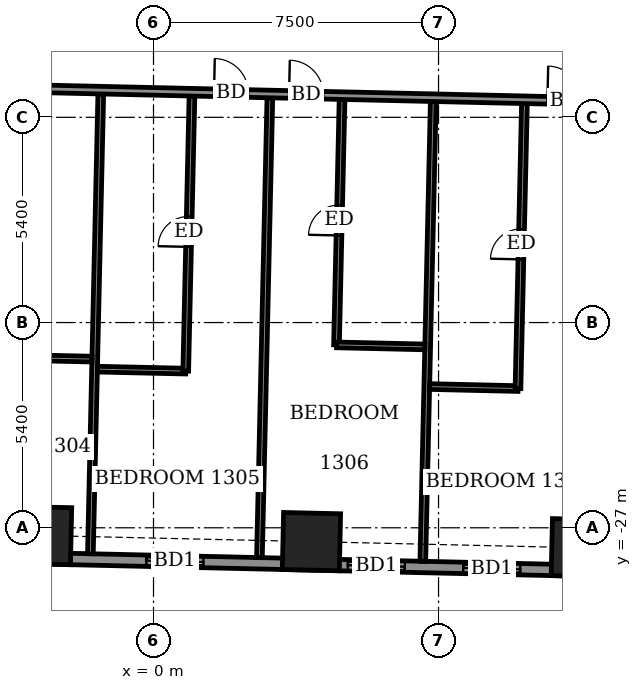
"""IFC4 building model, lengths in metres.
Left out: names, types, materials, properties, quantities, classifications, styles, units other than length and angle.
Written with IfcOpenShell. Run it as: python <this file> out.ifc"""

import sys

from ifc_helpers import new_model, si_unit, direction, frame, frame_2d, origin, origin_2d, place, context, subcontext, project, spatial, rectangle, extrude, element, fill, save


model = new_model("IFC4")
c1 = context("Model", 3, precision=1e-05, world=origin(), true_north=direction((0.0, 1.0)))
c2 = subcontext(c1, "Body", "Model", "MODEL_VIEW")
j1 = project(units=[si_unit("LENGTHUNIT", "METRE"), si_unit("PLANEANGLEUNIT", "RADIAN")], contexts=[c1])
p1 = place(None, origin())
s1 = spatial("IfcSite", under=j1, at=p1, CompositionType="ELEMENT")
p2 = place(p1, origin())
s2 = spatial("IfcBuilding", under=s1, at=p2, CompositionType="ELEMENT")
p3 = place(p2, frame((0.0, 0.0, 56.7)))
s3 = spatial("IfcBuildingStorey", under=s2, at=p3, CompositionType="ELEMENT", Elevation=56.7)
for number, where, z_axis, x_axis in (
    (1, (-2.919, -27.204, -0.55), (0.0, 0.0, 1.0), (1.0, -0.023, 0.0)),
    (2, (4.156, -27.364, -0.55), (0.0, 0.0, 1.0), (1.0, -0.023, 0.0)),
    (3, (11.23, -27.525, -0.55), (0.0, 0.0, 1.0), (1.0, -0.023, 0.0)),
):
    element("IfcColumn", number, at=place(p3, frame(where, z_axis=z_axis, x_axis=x_axis)), inside=s3, PredefinedType="COLUMN", context=c2, shape_type="SweptSolid", body=[
        extrude(rectangle(XDim=1.5, YDim=1.5, at=origin_2d()), origin(), (0.0, 0.0, 1.0), 3.6),
    ])
p4 = place(p3, frame((-24.007, -27.326, 0.0), z_axis=(0.0, 0.0, 1.0), x_axis=(0.999742536491, -0.022690542744, 0.0)))
e4 = element("IfcWall", 4, at=p4, inside=s3, PredefinedType="SOLIDWALL", context=c2, shape_type="SweptSolid", body=[
    extrude(rectangle(XDim=49.236, YDim=0.3, at=frame_2d((24.618, 0.0))), origin(), (0.0, 0.0, 1.0), 3.05),
])
p5 = place(p4, frame((2.115, 0.0, 0.0)))
e5 = element("IfcOpeningElement", 5, at=p5, cuts=e4, PredefinedType="OPENING", context=c2, shape_type="SweptSolid", body=[
    extrude(rectangle(XDim=1.5, YDim=2.4, at=frame_2d((0.75, 1.2))), frame((0.0, 0.16, 0.0), z_axis=(0.0, -1.0, 0.0), x_axis=(1.0, 0.0, 0.0)), (0.0, 0.0, 1.0), 0.32),
])
p6 = place(p4, frame((5.088, 0.0, 0.9)))
e6 = element("IfcOpeningElement", 6, at=p6, cuts=e4, PredefinedType="OPENING", context=c2, shape_type="SweptSolid", body=[
    extrude(rectangle(XDim=0.9, YDim=1.5, at=frame_2d((0.45, 0.75))), frame((0.0, 0.16, 0.0), z_axis=(0.0, -1.0, 0.0), x_axis=(1.0, 0.0, 0.0)), (0.0, 0.0, 1.0), 0.32),
])
p7 = place(p4, frame((10.475, 0.0, 0.0)))
e7 = element("IfcOpeningElement", 7, at=p7, cuts=e4, PredefinedType="OPENING", context=c2, shape_type="SweptSolid", body=[
    extrude(rectangle(XDim=1.5, YDim=2.4, at=frame_2d((0.75, 1.2))), frame((0.0, 0.16, 0.0), z_axis=(0.0, -1.0, 0.0), x_axis=(1.0, 0.0, 0.0)), (0.0, 0.0, 1.0), 0.32),
])
p8 = place(p4, frame((15.477, 0.0, 0.0)))
e8 = element("IfcOpeningElement", 8, at=p8, cuts=e4, PredefinedType="OPENING", context=c2, shape_type="SweptSolid", body=[
    extrude(rectangle(XDim=1.5, YDim=2.4, at=frame_2d((0.75, 1.2))), frame((0.0, 0.16, 0.0), z_axis=(0.0, -1.0, 0.0), x_axis=(1.0, 0.0, 0.0)), (0.0, 0.0, 1.0), 0.32),
])
p9 = place(p4, frame((18.515, 0.0, 0.0)))
e9 = element("IfcOpeningElement", 9, at=p9, cuts=e4, PredefinedType="OPENING", context=c2, shape_type="SweptSolid", body=[
    extrude(rectangle(XDim=1.5, YDim=2.4, at=frame_2d((0.75, 1.2))), frame((0.0, 0.16, 0.0), z_axis=(0.0, -1.0, 0.0), x_axis=(1.0, 0.0, 0.0)), (0.0, 0.0, 1.0), 0.32),
])
p10 = place(p4, frame((23.825, 0.0, 0.0)))
e10 = element("IfcOpeningElement", 10, at=p10, cuts=e4, PredefinedType="OPENING", context=c2, shape_type="SweptSolid", body=[
    extrude(rectangle(XDim=1.5, YDim=2.4, at=frame_2d((0.75, 1.2))), frame((0.0, 0.16, 0.0), z_axis=(0.0, -1.0, 0.0), x_axis=(1.0, 0.0, 0.0)), (0.0, 0.0, 1.0), 0.32),
])
p11 = place(p4, frame((29.128, 0.0, 0.0)))
e11 = element("IfcOpeningElement", 11, at=p11, cuts=e4, PredefinedType="OPENING", context=c2, shape_type="SweptSolid", body=[
    extrude(rectangle(XDim=1.5, YDim=2.4, at=frame_2d((0.75, 1.2))), frame((0.0, 0.16, 0.0), z_axis=(0.0, -1.0, 0.0), x_axis=(1.0, 0.0, 0.0)), (0.0, 0.0, 1.0), 0.32),
])
p12 = place(p4, frame((32.166, 0.0, 0.0)))
e12 = element("IfcOpeningElement", 12, at=p12, cuts=e4, PredefinedType="OPENING", context=c2, shape_type="SweptSolid", body=[
    extrude(rectangle(XDim=1.5, YDim=2.4, at=frame_2d((0.75, 1.2))), frame((0.0, 0.16, 0.0), z_axis=(0.0, -1.0, 0.0), x_axis=(1.0, 0.0, 0.0)), (0.0, 0.0, 1.0), 0.32),
])
p13 = place(p4, frame((37.091, 0.0, 0.0)))
e13 = element("IfcOpeningElement", 13, at=p13, cuts=e4, PredefinedType="OPENING", context=c2, shape_type="SweptSolid", body=[
    extrude(rectangle(XDim=1.5, YDim=2.4, at=frame_2d((0.75, 1.2))), frame((0.0, 0.16, 0.0), z_axis=(0.0, -1.0, 0.0), x_axis=(1.0, 0.0, 0.0)), (0.0, 0.0, 1.0), 0.32),
])
p14 = place(p4, frame((40.205, 0.0, 0.0)))
e14 = element("IfcOpeningElement", 14, at=p14, cuts=e4, PredefinedType="OPENING", context=c2, shape_type="SweptSolid", body=[
    extrude(rectangle(XDim=1.2, YDim=2.4, at=frame_2d((0.6, 1.2))), frame((0.0, 0.16, 0.0), z_axis=(0.0, -1.0, 0.0), x_axis=(1.0, 0.0, 0.0)), (0.0, 0.0, 1.0), 0.32),
])
p15 = place(p4, frame((45.047, 0.0, 0.9)))
e15 = element("IfcOpeningElement", 15, at=p15, cuts=e4, PredefinedType="OPENING", context=c2, shape_type="SweptSolid", body=[
    extrude(rectangle(XDim=2.4, YDim=1.5, at=frame_2d((1.2, 0.75))), frame((0.0, 0.16, 0.0), z_axis=(0.0, -1.0, 0.0), x_axis=(1.0, 0.0, 0.0)), (0.0, 0.0, 1.0), 0.32),
])
p16 = place(p3, frame((-1.661, -27.683, 0.0), z_axis=(0.0, 0.0, 1.0), x_axis=(0.022637991173, 0.99974372784, 0.0)))
e16 = element("IfcWall", 16, at=p16, inside=s3, PredefinedType="PARTITIONING", context=c2, shape_type="SweptSolid", body=[
    extrude(rectangle(XDim=12.1, YDim=0.15, at=frame_2d((6.05, 0.0))), origin(), (0.0, 0.0, 1.0), 2.55),
])
p17 = place(p3, frame((2.787, -27.784, 0.0), z_axis=(0.0, 0.0, 1.0), x_axis=(0.022719113715, 0.999741887625, 0.0)))
e17 = element("IfcWall", 17, at=p17, inside=s3, PredefinedType="PARTITIONING", context=c2, shape_type="SweptSolid", body=[
    extrude(rectangle(XDim=12.1, YDim=0.15, at=frame_2d((6.05, 0.0))), origin(), (0.0, 0.0, 1.0), 2.55),
])
p18 = place(p3, frame((7.086, -27.882, 0.0), z_axis=(0.0, 0.0, 1.0), x_axis=(0.022736986912, 0.999741481297, 0.0)))
e18 = element("IfcWall", 18, at=p18, inside=s3, PredefinedType="PARTITIONING", context=c2, shape_type="SweptSolid", body=[
    extrude(rectangle(XDim=12.101, YDim=0.15, at=frame_2d((6.051, 0.0))), origin(), (0.0, 0.0, 1.0), 2.55),
])
p19 = place(p3, frame((7.268, -23.284, 0.0), z_axis=(0.0, 0.0, 1.0), x_axis=(0.999740260747, -0.02279059109, 0.0)))
e19 = element("IfcWall", 19, at=p19, inside=s3, PredefinedType="PARTITIONING", context=c2, shape_type="SweptSolid", body=[
    extrude(rectangle(XDim=2.324, YDim=0.15, at=frame_2d((1.162, 0.0))), origin(), (0.0, 0.0, 1.0), 3.05),
])
p20 = place(p3, frame((9.59, -23.337, 0.0), z_axis=(0.0, 0.0, 1.0), x_axis=(0.022657071855, 0.999743295599, 0.0)))
e20 = element("IfcWall", 20, at=p20, inside=s3, PredefinedType="PARTITIONING", context=c2, shape_type="SweptSolid", body=[
    extrude(rectangle(XDim=7.5, YDim=0.15, at=frame_2d((3.75, 0.0))), origin(), (0.0, 0.0, 1.0), 3.05),
])
p21 = place(p20, frame((3.4, 0.0, 0.0)))
e21 = element("IfcOpeningElement", 21, at=p21, cuts=e20, PredefinedType="OPENING", context=c2, shape_type="SweptSolid", body=[
    extrude(rectangle(XDim=0.8, YDim=2.1, at=frame_2d((0.4, 1.05))), frame((0.0, 0.085, 0.0), z_axis=(0.0, -1.0, 0.0), x_axis=(1.0, 0.0, 0.0)), (0.0, 0.0, 1.0), 0.17),
])
p22 = place(p3, frame((-1.474, -22.826, 0.0), z_axis=(0.0, 0.0, 1.0), x_axis=(0.999749797124, -0.022368351553, 0.0)))
e22 = element("IfcWall", 22, at=p22, inside=s3, PredefinedType="PARTITIONING", context=c2, shape_type="SweptSolid", body=[
    extrude(rectangle(XDim=2.325, YDim=0.15, at=frame_2d((1.162, 0.0))), origin(), (0.0, 0.0, 1.0), 3.05),
])
p23 = place(p3, frame((0.848, -22.878, 0.0), z_axis=(0.0, 0.0, 1.0), x_axis=(0.022660891034, 0.999743209038, 0.0)))
e23 = element("IfcWall", 23, at=p23, inside=s3, PredefinedType="PARTITIONING", context=c2, shape_type="SweptSolid", body=[
    extrude(rectangle(XDim=7.24, YDim=0.15, at=frame_2d((3.62, 0.0))), origin(), (0.0, 0.0, 1.0), 3.05),
])
p24 = place(p23, frame((3.27, 0.0, 0.0)))
e24 = element("IfcOpeningElement", 24, at=p24, cuts=e23, PredefinedType="OPENING", context=c2, shape_type="SweptSolid", body=[
    extrude(rectangle(XDim=0.8, YDim=2.1, at=frame_2d((0.4, 1.05))), frame((0.0, 0.085, 0.0), z_axis=(0.0, -1.0, 0.0), x_axis=(1.0, 0.0, 0.0)), (0.0, 0.0, 1.0), 0.17),
])
p25 = place(p3, frame((-3.943, -22.51, 0.0), z_axis=(0.0, 0.0, 1.0), x_axis=(0.999750007167, -0.022358961731, 0.0)))
e25 = element("IfcWall", 25, at=p25, inside=s3, PredefinedType="PARTITIONING", context=c2, shape_type="SweptSolid", body=[
    extrude(rectangle(XDim=2.326, YDim=0.15, at=frame_2d((1.163, 0.0))), origin(), (0.0, 0.0, 1.0), 3.05),
])
p26 = place(p3, frame((4.815, -22.188, 0.0), z_axis=(0.0, 0.0, 1.0), x_axis=(0.022601211511, 0.999744559994, 0.0)))
e26 = element("IfcWall", 26, at=p26, inside=s3, PredefinedType="PARTITIONING", context=c2, shape_type="SweptSolid", body=[
    extrude(rectangle(XDim=6.46, YDim=0.15, at=frame_2d((3.23, 0.0))), origin(), (0.0, 0.0, 1.0), 3.05),
])
p27 = place(p26, frame((2.88, 0.0, 0.0)))
e27 = element("IfcOpeningElement", 27, at=p27, cuts=e26, PredefinedType="OPENING", context=c2, shape_type="SweptSolid", body=[
    extrude(rectangle(XDim=0.8, YDim=2.1, at=frame_2d((0.4, 1.05))), frame((0.0, 0.085, 0.0), z_axis=(0.0, -1.0, 0.0), x_axis=(1.0, 0.0, 0.0)), (0.0, 0.0, 1.0), 0.17),
])
p28 = place(p3, frame((4.817, -22.188, 0.0), z_axis=(0.0, 0.0, 1.0), x_axis=(0.99974031529, -0.022788198363, 0.0)))
e28 = element("IfcWall", 28, at=p28, inside=s3, PredefinedType="PARTITIONING", context=c2, shape_type="SweptSolid", body=[
    extrude(rectangle(XDim=2.325, YDim=0.15, at=frame_2d((1.162, 0.0))), origin(), (0.0, 0.0, 1.0), 3.05),
])
p29 = place(p3, frame((-26.126, -14.924, 0.0), z_axis=(0.0, 0.0, 1.0), x_axis=(0.999742687583, -0.0226838847, 0.0)))
e29 = element("IfcWall", 29, at=p29, inside=s3, PredefinedType="PARTITIONING", context=c2, shape_type="SweptSolid", body=[
    extrude(rectangle(XDim=54.836, YDim=0.2, at=frame_2d((27.418, 0.0))), origin(), (0.0, 0.0, 1.0), 3.05),
])
p30 = place(p29, frame((0.775, 0.0, 0.0)))
e30 = element("IfcOpeningElement", 30, at=p30, cuts=e29, PredefinedType="OPENING", context=c2, shape_type="SweptSolid", body=[
    extrude(rectangle(XDim=1.0, YDim=2.1, at=frame_2d((0.5, 1.05))), frame((0.0, 0.11, 0.0), z_axis=(0.0, -1.0, 0.0), x_axis=(1.0, 0.0, 0.0)), (0.0, 0.0, 1.0), 0.22),
])
p31 = place(p29, frame((5.45, 0.0, 0.0)))
e31 = element("IfcOpeningElement", 31, at=p31, cuts=e29, PredefinedType="OPENING", context=c2, shape_type="SweptSolid", body=[
    extrude(rectangle(XDim=0.9, YDim=2.1, at=frame_2d((0.45, 1.05))), frame((0.0, 0.11, 0.0), z_axis=(0.0, -1.0, 0.0), x_axis=(1.0, 0.0, 0.0)), (0.0, 0.0, 1.0), 0.22),
])
p32 = place(p29, frame((10.0, 0.0, 0.0)))
e32 = element("IfcOpeningElement", 32, at=p32, cuts=e29, PredefinedType="OPENING", context=c2, shape_type="SweptSolid", body=[
    extrude(rectangle(XDim=0.9, YDim=2.1, at=frame_2d((0.45, 1.05))), frame((0.0, 0.11, 0.0), z_axis=(0.0, -1.0, 0.0), x_axis=(1.0, 0.0, 0.0)), (0.0, 0.0, 1.0), 0.22),
])
p33 = place(p29, frame((11.975, 0.0, 0.0)))
e33 = element("IfcOpeningElement", 33, at=p33, cuts=e29, PredefinedType="OPENING", context=c2, shape_type="SweptSolid", body=[
    extrude(rectangle(XDim=0.9, YDim=2.1, at=frame_2d((0.45, 1.05))), frame((0.0, 0.11, 0.0), z_axis=(0.0, -1.0, 0.0), x_axis=(1.0, 0.0, 0.0)), (0.0, 0.0, 1.0), 0.22),
])
p34 = place(p29, frame((18.85, 0.0, 0.0)))
e34 = element("IfcOpeningElement", 34, at=p34, cuts=e29, PredefinedType="OPENING", context=c2, shape_type="SweptSolid", body=[
    extrude(rectangle(XDim=0.9, YDim=2.1, at=frame_2d((0.45, 1.05))), frame((0.0, 0.11, 0.0), z_axis=(0.0, -1.0, 0.0), x_axis=(1.0, 0.0, 0.0)), (0.0, 0.0, 1.0), 0.22),
])
p35 = place(p29, frame((20.9, 0.0, 0.0)))
e35 = element("IfcOpeningElement", 35, at=p35, cuts=e29, PredefinedType="OPENING", context=c2, shape_type="SweptSolid", body=[
    extrude(rectangle(XDim=0.9, YDim=2.1, at=frame_2d((0.45, 1.05))), frame((0.0, 0.11, 0.0), z_axis=(0.0, -1.0, 0.0), x_axis=(1.0, 0.0, 0.0)), (0.0, 0.0, 1.0), 0.22),
])
p36 = place(p29, frame((27.725, 0.0, 0.0)))
e36 = element("IfcOpeningElement", 36, at=p36, cuts=e29, PredefinedType="OPENING", context=c2, shape_type="SweptSolid", body=[
    extrude(rectangle(XDim=0.9, YDim=2.1, at=frame_2d((0.45, 1.05))), frame((0.0, 0.11, 0.0), z_axis=(0.0, -1.0, 0.0), x_axis=(1.0, 0.0, 0.0)), (0.0, 0.0, 1.0), 0.22),
])
p37 = place(p29, frame((29.7, 0.0, 0.0)))
e37 = element("IfcOpeningElement", 37, at=p37, cuts=e29, PredefinedType="OPENING", context=c2, shape_type="SweptSolid", body=[
    extrude(rectangle(XDim=0.9, YDim=2.1, at=frame_2d((0.45, 1.05))), frame((0.0, 0.11, 0.0), z_axis=(0.0, -1.0, 0.0), x_axis=(1.0, 0.0, 0.0)), (0.0, 0.0, 1.0), 0.22),
])
p38 = place(p29, frame((36.5, 0.0, 0.0)))
e38 = element("IfcOpeningElement", 38, at=p38, cuts=e29, PredefinedType="OPENING", context=c2, shape_type="SweptSolid", body=[
    extrude(rectangle(XDim=0.9, YDim=2.1, at=frame_2d((0.45, 1.05))), frame((0.0, 0.11, 0.0), z_axis=(0.0, -1.0, 0.0), x_axis=(1.0, 0.0, 0.0)), (0.0, 0.0, 1.0), 0.22),
])
p39 = place(p29, frame((38.525, 0.0, 0.0)))
e39 = element("IfcOpeningElement", 39, at=p39, cuts=e29, PredefinedType="OPENING", context=c2, shape_type="SweptSolid", body=[
    extrude(rectangle(XDim=0.9, YDim=2.1, at=frame_2d((0.45, 1.05))), frame((0.0, 0.11, 0.0), z_axis=(0.0, -1.0, 0.0), x_axis=(1.0, 0.0, 0.0)), (0.0, 0.0, 1.0), 0.22),
])
p40 = place(p29, frame((45.325, 0.0, 0.0)))
e40 = element("IfcOpeningElement", 40, at=p40, cuts=e29, PredefinedType="OPENING", context=c2, shape_type="SweptSolid", body=[
    extrude(rectangle(XDim=0.9, YDim=2.1, at=frame_2d((0.45, 1.05))), frame((0.0, 0.11, 0.0), z_axis=(0.0, -1.0, 0.0), x_axis=(1.0, 0.0, 0.0)), (0.0, 0.0, 1.0), 0.22),
])
p41 = place(p29, frame((52.593, 0.0, 0.0)))
e41 = element("IfcOpeningElement", 41, at=p41, cuts=e29, PredefinedType="OPENING", context=c2, shape_type="SweptSolid", body=[
    extrude(rectangle(XDim=1.0, YDim=2.1, at=frame_2d((0.5, 1.05))), frame((0.0, 0.11, 0.0), z_axis=(0.0, -1.0, 0.0), x_axis=(1.0, 0.0, 0.0)), (0.0, 0.0, 1.0), 0.22),
])
p42 = place(p29, frame((47.55, 0.0, 0.0)))
e42 = element("IfcOpeningElement", 42, at=p42, cuts=e29, PredefinedType="OPENING", context=c2, shape_type="SweptSolid", body=[
    extrude(rectangle(XDim=0.9, YDim=2.1, at=frame_2d((0.45, 1.05))), frame((0.0, 0.11, 0.0), z_axis=(0.0, -1.0, 0.0), x_axis=(1.0, 0.0, 0.0)), (0.0, 0.0, 1.0), 0.22),
])
p43 = place(p10, origin())
e43 = element("IfcDoor", 43, at=p43, inside=s3, OperationType="SLIDING_TO_LEFT", PredefinedType="DOOR", context=c2, shape_type="SweptSolid", body=[
    extrude(rectangle(XDim=1.5, YDim=2.4, at=frame_2d((0.75, 1.2))), frame((0.0, 0.025, 0.0), z_axis=(0.0, -1.0, 0.0), x_axis=(1.0, 0.0, 0.0)), (0.0, 0.0, 1.0), 0.05),
])
fill(e10, e43)
p44 = place(p11, origin())
e44 = element("IfcDoor", 44, at=p44, inside=s3, OperationType="SLIDING_TO_LEFT", PredefinedType="DOOR", context=c2, shape_type="SweptSolid", body=[
    extrude(rectangle(XDim=1.5, YDim=2.4, at=frame_2d((0.75, 1.2))), frame((0.0, 0.025, 0.0), z_axis=(0.0, -1.0, 0.0), x_axis=(1.0, 0.0, 0.0)), (0.0, 0.0, 1.0), 0.05),
])
fill(e11, e44)
p45 = place(p12, origin())
e45 = element("IfcDoor", 45, at=p45, inside=s3, OperationType="SLIDING_TO_LEFT", PredefinedType="DOOR", context=c2, shape_type="SweptSolid", body=[
    extrude(rectangle(XDim=1.5, YDim=2.4, at=frame_2d((0.75, 1.2))), frame((0.0, 0.025, 0.0), z_axis=(0.0, -1.0, 0.0), x_axis=(1.0, 0.0, 0.0)), (0.0, 0.0, 1.0), 0.05),
])
fill(e12, e45)
p46 = place(p36, origin())
e46 = element("IfcDoor", 46, at=p46, inside=s3, OperationType="SINGLE_SWING_LEFT", PredefinedType="DOOR", context=c2, shape_type="SweptSolid", body=[
    extrude(rectangle(XDim=0.9, YDim=2.1, at=frame_2d((0.45, 1.05))), frame((0.0, 0.025, 0.0), z_axis=(0.0, -1.0, 0.0), x_axis=(1.0, 0.0, 0.0)), (0.0, 0.0, 1.0), 0.05),
])
fill(e36, e46)
p47 = place(p24, origin())
e47 = element("IfcDoor", 47, at=p47, inside=s3, OperationType="SINGLE_SWING_LEFT", PredefinedType="DOOR", context=c2, shape_type="SweptSolid", body=[
    extrude(rectangle(XDim=0.8, YDim=2.1, at=frame_2d((0.4, 1.05))), frame((0.0, 0.025, 0.0), z_axis=(0.0, -1.0, 0.0), x_axis=(1.0, 0.0, 0.0)), (0.0, 0.0, 1.0), 0.05),
])
fill(e24, e47)
p48 = place(p37, origin())
e48 = element("IfcDoor", 48, at=p48, inside=s3, OperationType="SINGLE_SWING_RIGHT", PredefinedType="DOOR", context=c2, shape_type="SweptSolid", body=[
    extrude(rectangle(XDim=0.9, YDim=2.1, at=frame_2d((0.45, 1.05))), frame((0.0, 0.025, 0.0), z_axis=(0.0, -1.0, 0.0), x_axis=(1.0, 0.0, 0.0)), (0.0, 0.0, 1.0), 0.05),
])
fill(e37, e48)
p49 = place(p27, origin())
e49 = element("IfcDoor", 49, at=p49, inside=s3, OperationType="SINGLE_SWING_RIGHT", PredefinedType="DOOR", context=c2, shape_type="SweptSolid", body=[
    extrude(rectangle(XDim=0.8, YDim=2.1, at=frame_2d((0.4, 1.05))), frame((0.0, 0.025, 0.0), z_axis=(0.0, -1.0, 0.0), x_axis=(1.0, 0.0, 0.0)), (0.0, 0.0, 1.0), 0.05),
])
fill(e27, e49)
p50 = place(p38, origin())
e50 = element("IfcDoor", 50, at=p50, inside=s3, OperationType="SINGLE_SWING_LEFT", PredefinedType="DOOR", context=c2, shape_type="SweptSolid", body=[
    extrude(rectangle(XDim=0.9, YDim=2.1, at=frame_2d((0.45, 1.05))), frame((0.0, 0.025, 0.0), z_axis=(0.0, -1.0, 0.0), x_axis=(1.0, 0.0, 0.0)), (0.0, 0.0, 1.0), 0.05),
])
fill(e38, e50)
p51 = place(p21, origin())
e51 = element("IfcDoor", 51, at=p51, inside=s3, OperationType="SINGLE_SWING_LEFT", PredefinedType="DOOR", context=c2, shape_type="SweptSolid", body=[
    extrude(rectangle(XDim=0.8, YDim=2.1, at=frame_2d((0.4, 1.05))), frame((0.0, 0.025, 0.0), z_axis=(0.0, -1.0, 0.0), x_axis=(1.0, 0.0, 0.0)), (0.0, 0.0, 1.0), 0.05),
])
fill(e21, e51)
save(model, sys.argv[1])
